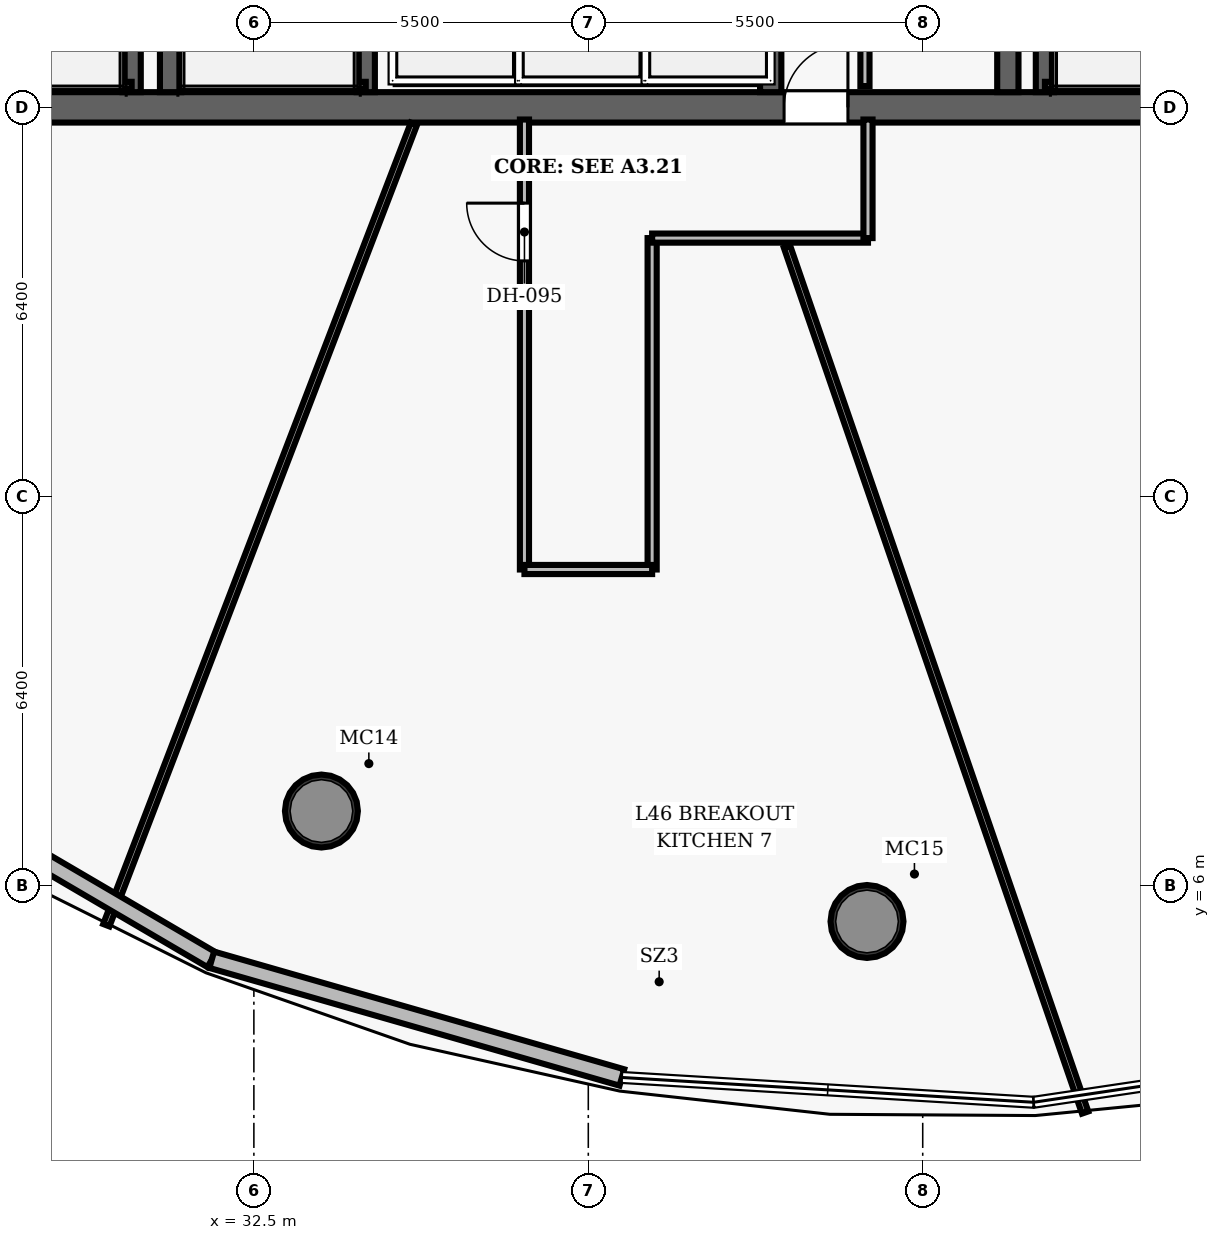
"""IFC4 building model, lengths in metres.
Left out: names, types, materials, properties, quantities, classifications, styles, units other than length and angle.
Written with IfcOpenShell. Run it as: python <this file> out.ifc"""

import sys

from ifc_helpers import new_model, si_unit, direction, frame, frame_2d, origin, origin_2d, place, context, subcontext, project, spatial, rectangle, hollow_circle, extrude, element, fill, save


model = new_model("IFC4")
c1 = context("Model", 3, precision=1e-05, world=origin(), true_north=direction((0.0, 1.0)))
c2 = subcontext(c1, "Body", "Model", "MODEL_VIEW")
j1 = project(units=[si_unit("LENGTHUNIT", "METRE"), si_unit("PLANEANGLEUNIT", "RADIAN")], contexts=[c1])
p1 = place(None, origin())
s1 = spatial("IfcSite", under=j1, at=p1, CompositionType="ELEMENT")
p2 = place(p1, origin())
s2 = spatial("IfcBuilding", under=s1, at=p2, CompositionType="ELEMENT")
p3 = place(p2, frame((0.0, 0.0, 182.75)))
s3 = spatial("IfcBuildingStorey", under=s2, at=p3, CompositionType="ELEMENT", Elevation=182.75)
p4 = place(p3, frame((26.75, 18.8, 0.0), z_axis=(0.0, 0.0, 1.0), x_axis=(1.0, 0.0, 0.0)))
e1 = element("IfcWall", 1, at=p4, inside=s3, PredefinedType="SHEAR", context=c2, shape_type="SweptSolid", body=[
    extrude(rectangle(XDim=22.5, YDim=0.5, at=frame_2d((11.25, 0.0))), origin(), (0.0, 0.0, 1.0), 3.85),
])
p5 = place(p4, frame((14.47, 0.0, 0.0)))
e2 = element("IfcOpeningElement", 2, at=p5, cuts=e1, PredefinedType="OPENING", context=c2, shape_type="SweptSolid", body=[
    extrude(rectangle(XDim=1.05, YDim=2.15, at=frame_2d((0.525, 1.075))), frame((0.0, 0.26, 0.0), z_axis=(0.0, -1.0, 0.0), x_axis=(1.0, 0.0, 0.0)), (0.0, 0.0, 1.0), 0.52),
])
for number, where, z_axis, x_axis in (
    (3, (31.13, 19.05, 0.0), (0.0, 0.0, 1.0), (0.0, 1.0, 0.0)),
    (4, (44.9, 19.05, 0.0), (0.0, 0.0, 1.0), (0.0, 1.0, 0.0)),
):
    element("IfcWall", number, at=place(p3, frame(where, z_axis=z_axis, x_axis=x_axis)), inside=s3, PredefinedType="SHEAR", context=c2, shape_type="SweptSolid", body=[
        extrude(rectangle(XDim=13.9, YDim=0.35, at=frame_2d((6.95, 0.0))), origin(), (0.0, 0.0, 1.0), 3.85),
    ])
for number, where, z_axis, x_axis in (
    (5, (33.611, 7.228, 0.0), (0.0, 0.0, 1.0), (1.0, 0.0, 0.0)),
    (6, (42.584, 5.412, 0.0), (0.0, 0.0, 1.0), (1.0, 0.0, 0.0)),
):
    element("IfcColumn", number, at=place(p3, frame(where, z_axis=z_axis, x_axis=x_axis)), inside=s3, PredefinedType="COLUMN", context=c2, shape_type="SweptSolid", body=[
        extrude(hollow_circle(Radius=0.6, WallThickness=0.05, at=origin_2d()), origin(), (0.0, 0.0, 1.0), 3.85),
    ])
p6 = place(p3, frame((30.49, 19.05, 0.0), z_axis=(0.0, 0.0, 1.0), x_axis=(0.0, 1.0, 0.0)))
e7 = element("IfcWall", 7, at=p6, inside=s3, PredefinedType="SHEAR", context=c2, shape_type="SweptSolid", body=[
    extrude(rectangle(XDim=7.5, YDim=0.3, at=frame_2d((3.75, 0.0))), origin(), (0.0, 0.0, 1.0), 3.85),
])
p7 = place(p3, frame((27.395, 19.16, 0.0), z_axis=(0.0, 0.0, 1.0), x_axis=(1.0, 0.0, 0.0)))
e8 = element("IfcWall", 8, at=p7, inside=s3, PredefinedType="SHEAR", context=c2, shape_type="SweptSolid", body=[
    extrude(rectangle(XDim=3.095, YDim=0.12, at=frame_2d((1.547, 0.0))), origin(), (0.0, 0.0, 1.0), 3.85),
])
p8 = place(p3, frame((45.51, 19.05, 0.0), z_axis=(0.0, 0.0, 1.0), x_axis=(0.0, 1.0, 0.0)))
e9 = element("IfcWall", 9, at=p8, inside=s3, PredefinedType="SHEAR", context=c2, shape_type="SweptSolid", body=[
    extrude(rectangle(XDim=7.5, YDim=0.3, at=frame_2d((3.75, 0.0))), origin(), (0.0, 0.0, 1.0), 3.85),
])
p9 = place(p3, frame((45.51, 19.16, 0.0), z_axis=(0.0, 0.0, 1.0), x_axis=(1.0, 0.0, 0.0)))
e10 = element("IfcWall", 10, at=p9, inside=s3, PredefinedType="SHEAR", context=c2, shape_type="SweptSolid", body=[
    extrude(rectangle(XDim=3.095, YDim=0.12, at=frame_2d((1.547, 0.0))), origin(), (0.0, 0.0, 1.0), 3.85),
])
p10 = place(p3, frame((34.34, 19.05, 0.0), z_axis=(0.0, 0.0, 1.0), x_axis=(0.0, 1.0, 0.0)))
e11 = element("IfcWall", 11, at=p10, inside=s3, PredefinedType="SHEAR", context=c2, shape_type="SweptSolid", body=[
    extrude(rectangle(XDim=7.5, YDim=0.3, at=frame_2d((3.75, 0.0))), origin(), (0.0, 0.0, 1.0), 3.85),
])
p11 = place(p3, frame((31.3, 19.16, 0.0), z_axis=(0.0, 0.0, 1.0), x_axis=(1.0, 0.0, 0.0)))
e12 = element("IfcWall", 12, at=p11, inside=s3, PredefinedType="SHEAR", context=c2, shape_type="SweptSolid", body=[
    extrude(rectangle(XDim=3.04, YDim=0.12, at=frame_2d((1.52, 0.0))), origin(), (0.0, 0.0, 1.0), 3.85),
])
p12 = place(p3, frame((41.0, 19.05, 0.0), z_axis=(0.0, 0.0, 1.0), x_axis=(0.0, 1.0, 0.0)))
e13 = element("IfcWall", 13, at=p12, inside=s3, PredefinedType="SHEAR", context=c2, shape_type="SweptSolid", body=[
    extrude(rectangle(XDim=2.08, YDim=0.35, at=frame_2d((1.04, 0.0))), origin(), (0.0, 0.0, 1.0), 3.035),
])
p13 = place(p3, frame((42.55, 19.15, 0.0), z_axis=(0.0, 0.0, 1.0), x_axis=(0.0, 1.0, 0.0)))
e14 = element("IfcWall", 14, at=p13, inside=s3, PredefinedType="PARTITIONING", context=c2, shape_type="SweptSolid", body=[
    extrude(rectangle(XDim=2.75, YDim=0.15, at=frame_2d((1.375, 0.0))), origin(), (0.0, 0.0, 1.0), 3.035),
])
p14 = place(p13, frame((0.7, 0.0, 0.0)))
e15 = element("IfcOpeningElement", 15, at=p14, cuts=e14, PredefinedType="OPENING", context=c2, shape_type="SweptSolid", body=[
    extrude(rectangle(XDim=0.85, YDim=2.1, at=frame_2d((0.425, 1.05))), frame((0.0, 0.085, 0.0), z_axis=(0.0, -1.0, 0.0), x_axis=(1.0, 0.0, 0.0)), (0.0, 0.0, 1.0), 0.17),
])
p15 = place(p3, frame((36.95, 11.2, 0.0), z_axis=(0.0, 0.0, 1.0), x_axis=(0.0, 1.0, 0.0)))
e16 = element("IfcWall", 16, at=p15, inside=s3, PredefinedType="PARTITIONING", context=c2, shape_type="SweptSolid", body=[
    extrude(rectangle(XDim=7.4, YDim=0.15, at=frame_2d((3.7, 0.0))), origin(), (0.0, 0.0, 1.0), 3.035),
])
p16 = place(p15, frame((5.075, 0.0, 0.0)))
e17 = element("IfcOpeningElement", 17, at=p16, cuts=e16, PredefinedType="OPENING", context=c2, shape_type="SweptSolid", body=[
    extrude(rectangle(XDim=0.95, YDim=2.15, at=frame_2d((0.475, 1.075))), frame((0.0, 0.085, 0.0), z_axis=(0.0, -1.0, 0.0), x_axis=(1.0, 0.0, 0.0)), (0.0, 0.0, 1.0), 0.17),
])
p17 = place(p3, frame((39.05, 11.2, 0.0), z_axis=(0.0, 0.0, 1.0), x_axis=(0.0, 1.0, 0.0)))
e18 = element("IfcWall", 18, at=p17, inside=s3, PredefinedType="PARTITIONING", context=c2, shape_type="SweptSolid", body=[
    extrude(rectangle(XDim=5.45, YDim=0.15, at=frame_2d((2.725, 0.0))), origin(), (0.0, 0.0, 1.0), 3.035),
])
p18 = place(p3, frame((39.05, 16.65, 0.0), z_axis=(0.0, 0.0, 1.0), x_axis=(1.0, 0.0, 0.0)))
e19 = element("IfcWall", 19, at=p18, inside=s3, PredefinedType="PARTITIONING", context=c2, shape_type="SweptSolid", body=[
    extrude(rectangle(XDim=3.55, YDim=0.15, at=frame_2d((1.775, 0.0))), origin(), (0.0, 0.0, 1.0), 3.035),
])
p19 = place(p3, frame((42.6, 16.65, 0.0), z_axis=(0.0, 0.0, 1.0), x_axis=(0.0, 1.0, 0.0)))
e20 = element("IfcWall", 20, at=p19, inside=s3, PredefinedType="PARTITIONING", context=c2, shape_type="SweptSolid", body=[
    extrude(rectangle(XDim=1.95, YDim=0.15, at=frame_2d((0.975, 0.0))), origin(), (0.0, 0.0, 1.0), 3.035),
])
p20 = place(p3, frame((36.95, 11.2, 0.0), z_axis=(0.0, 0.0, 1.0), x_axis=(1.0, 0.0, 0.0)))
e21 = element("IfcWall", 21, at=p20, inside=s3, PredefinedType="PARTITIONING", context=c2, shape_type="SweptSolid", body=[
    extrude(rectangle(XDim=2.1, YDim=0.15, at=frame_2d((1.05, 0.0))), origin(), (0.0, 0.0, 1.0), 3.035),
])
p21 = place(p3, frame((35.133, 18.53, 0.0), z_axis=(0.0, 0.0, 1.0), x_axis=(-0.358369457817, -0.933579847525, 0.0)))
e22 = element("IfcWall", 22, at=p21, inside=s3, PredefinedType="PARTITIONING", context=c2, shape_type="SweptSolid", body=[
    extrude(rectangle(XDim=14.118, YDim=0.11, at=frame_2d((7.059, 0.0))), origin(), (0.0, 0.0, 1.0), 3.035),
])
p22 = place(p3, frame((41.268, 16.51, 0.0), z_axis=(0.0, 0.0, 1.0), x_axis=(0.325569009089, -0.945518281326, 0.0)))
e23 = element("IfcWall", 23, at=p22, inside=s3, PredefinedType="PARTITIONING", context=c2, shape_type="SweptSolid", body=[
    extrude(rectangle(XDim=15.061, YDim=0.11, at=frame_2d((7.53, 0.0))), origin(), (0.0, 0.0, 1.0), 3.035),
])
p23 = place(p3, frame((31.807, 4.782, 0.0), z_axis=(0.0, 0.0, 1.0), x_axis=(-0.862929340309, 0.505324602246, 0.0)))
e24 = element("IfcWall", 24, at=p23, inside=s3, PredefinedType="SOLIDWALL", context=c2, shape_type="SweptSolid", body=[
    extrude(rectangle(XDim=7.046, YDim=0.28, at=frame_2d((3.523, 0.0))), origin(), (0.0, 0.0, 1.0), 3.62),
])
p24 = place(p3, frame((38.552, 2.846, 0.0), z_axis=(0.0, 0.0, 1.0), x_axis=(-0.961210872826, 0.275814535443, 0.0)))
e25 = element("IfcWall", 25, at=p24, inside=s3, PredefinedType="SOLIDWALL", context=c2, shape_type="SweptSolid", body=[
    extrude(rectangle(XDim=7.018, YDim=0.28, at=frame_2d((3.509, 0.0))), origin(), (0.0, 0.0, 1.0), 3.62),
])
p25 = place(p5, origin())
e26 = element("IfcDoor", 26, at=p25, inside=s3, OperationType="SINGLE_SWING_RIGHT", PredefinedType="DOOR", context=c2, shape_type="SweptSolid", body=[
    extrude(rectangle(XDim=1.05, YDim=2.15, at=frame_2d((0.525, 1.075))), frame((0.0, 0.025, 0.0), z_axis=(0.0, -1.0, 0.0), x_axis=(1.0, 0.0, 0.0)), (0.0, 0.0, 1.0), 0.05),
])
fill(e2, e26)
p26 = place(p16, origin())
e27 = element("IfcDoor", 27, at=p26, inside=s3, OperationType="SINGLE_SWING_RIGHT", PredefinedType="DOOR", context=c2, shape_type="SweptSolid", body=[
    extrude(rectangle(XDim=0.95, YDim=2.15, at=frame_2d((0.475, 1.075))), frame((0.0, 0.025, 0.0), z_axis=(0.0, -1.0, 0.0), x_axis=(1.0, 0.0, 0.0)), (0.0, 0.0, 1.0), 0.05),
])
fill(e17, e27)
save(model, sys.argv[1])
